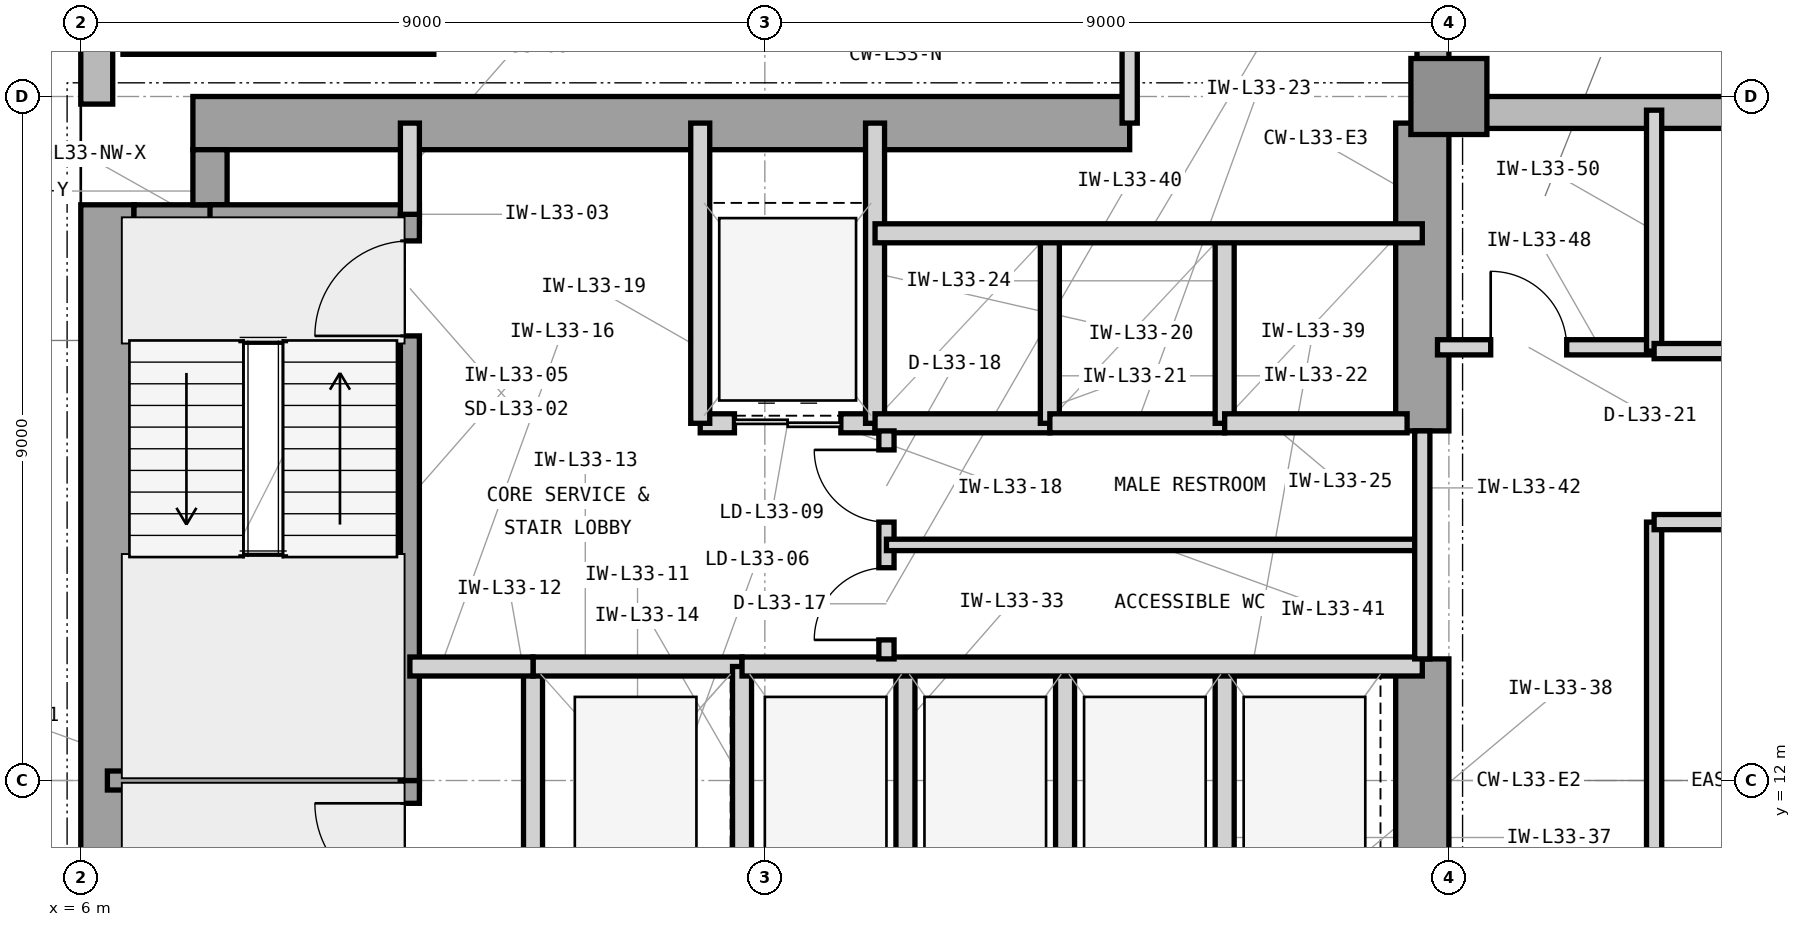
"""IFC4 building model, lengths in metres.
Left out: names, types, materials, properties, quantities, classifications, styles, units other than length and angle.
Written with IfcOpenShell. Run it as: python <this file> out.ifc"""

import sys

from ifc_helpers import new_model, si_unit, direction, frame, frame_2d, origin, origin_2d, place, context, subcontext, project, spatial, rectangle, extrude, element, fill, save


model = new_model("IFC4")
c1 = context("Model", 3, precision=1e-05, world=origin(), true_north=direction((0.0, 1.0)))
c2 = subcontext(c1, "Body", "Model", "MODEL_VIEW")
j1 = project(units=[si_unit("LENGTHUNIT", "METRE"), si_unit("PLANEANGLEUNIT", "RADIAN")], contexts=[c1])
p1 = place(None, origin())
s1 = spatial("IfcSite", under=j1, at=p1, CompositionType="ELEMENT")
p2 = place(p1, origin())
s2 = spatial("IfcBuilding", under=s1, at=p2, CompositionType="ELEMENT")
p3 = place(p2, frame((0.0, 0.0, 140.1)))
s3 = spatial("IfcBuildingStorey", under=s2, at=p3, CompositionType="ELEMENT", Elevation=140.1)
p4 = place(p3, frame((6.35, 4.425, 0.0), z_axis=(0.0, 0.0, 1.0), x_axis=(0.0, 1.0, 0.0)))
e1 = element("IfcWall", 1, at=p4, inside=s3, PredefinedType="SHEAR", context=c2, shape_type="SweptSolid", body=[
    extrude(rectangle(XDim=15.15, YDim=0.7, at=frame_2d((7.575, 0.0))), origin(), (0.0, 0.0, 1.0), 3.9),
])
p5 = place(p3, frame((7.475, 20.65, 0.0), z_axis=(0.0, 0.0, 1.0), x_axis=(1.0, 0.0, 0.0)))
e2 = element("IfcWall", 2, at=p5, inside=s3, PredefinedType="SHEAR", context=c2, shape_type="SweptSolid", body=[
    extrude(rectangle(XDim=12.325, YDim=0.7, at=frame_2d((6.163, 0.0))), origin(), (0.0, 0.0, 1.0), 3.9),
])
p6 = place(p3, frame((23.65, 10.4, 0.0), z_axis=(0.0, 0.0, 1.0), x_axis=(0.0, 1.0, 0.0)))
e3 = element("IfcWall", 3, at=p6, inside=s3, PredefinedType="SHEAR", context=c2, shape_type="SweptSolid", body=[
    extrude(rectangle(XDim=3.2, YDim=0.7, at=frame_2d((1.6, 0.0))), origin(), (0.0, 0.0, 1.0), 3.9),
])
p7 = place(p3, frame((23.65, 16.6, 0.0), z_axis=(0.0, 0.0, 1.0), x_axis=(0.0, 1.0, 0.0)))
e4 = element("IfcWall", 4, at=p7, inside=s3, PredefinedType="SHEAR", context=c2, shape_type="SweptSolid", body=[
    extrude(rectangle(XDim=4.05, YDim=0.7, at=frame_2d((2.025, 0.0))), origin(), (0.0, 0.0, 1.0), 3.9),
])
p8 = place(p3, frame((6.7, 19.35, 0.0), z_axis=(0.0, 0.0, 1.0), x_axis=(1.0, 0.0, 0.0)))
e5 = element("IfcWall", 5, at=p8, inside=s3, PredefinedType="SHEAR", context=c2, shape_type="SweptSolid", body=[
    extrude(rectangle(XDim=1.225, YDim=0.45, at=frame_2d((0.613, 0.0))), origin(), (0.0, 0.0, 1.0), 3.9),
])
p9 = place(p3, frame((7.7, 19.575, 0.0), z_axis=(0.0, 0.0, 1.0), x_axis=(0.0, 1.0, 0.0)))
e6 = element("IfcWall", 6, at=p9, inside=s3, PredefinedType="SHEAR", context=c2, shape_type="SweptSolid", body=[
    extrude(rectangle(XDim=0.725, YDim=0.45, at=frame_2d((0.363, 0.0))), origin(), (0.0, 0.0, 1.0), 3.9),
])
p10 = place(p3, frame((24.0, 21.0, 0.0), z_axis=(0.0, 0.0, 1.0), x_axis=(1.0, 0.0, 0.0)))
e7 = element("IfcColumn", 7, at=p10, inside=s3, PredefinedType="COLUMN", context=c2, shape_type="SweptSolid", body=[
    extrude(rectangle(XDim=1.0, YDim=1.0, at=origin_2d()), origin(), (0.0, 0.0, 1.0), 3.9),
])
p11 = place(p3, frame((58.4, 20.79, 0.0), z_axis=(0.0, 0.0, 1.0), x_axis=(-1.0, 0.0, 0.0)))
e8 = element("IfcWall", 8, at=p11, inside=s3, PredefinedType="STANDARD", context=c2, shape_type="SweptSolid", body=[
    extrude(rectangle(XDim=34.4, YDim=0.42, at=frame_2d((17.2, 0.0))), origin(), (0.0, 0.0, 1.0), 3.7),
])
p12 = place(p11, frame((20.864, 0.0, 0.85)))
e9 = element("IfcOpeningElement", 9, at=p12, cuts=e8, PredefinedType="OPENING", context=c2, shape_type="SweptSolid", body=[
    extrude(rectangle(XDim=2.5, YDim=2.25, at=frame_2d((1.25, 1.125))), frame((0.0, 0.22, 0.0), z_axis=(0.0, -1.0, 0.0), x_axis=(1.0, 0.0, 0.0)), (0.0, 0.0, 1.0), 0.44),
])
p13 = place(p11, frame((11.386, 0.0, 0.85)))
e10 = element("IfcOpeningElement", 10, at=p13, cuts=e8, PredefinedType="OPENING", context=c2, shape_type="SweptSolid", body=[
    extrude(rectangle(XDim=2.5, YDim=2.25, at=frame_2d((1.25, 1.125))), frame((0.0, 0.22, 0.0), z_axis=(0.0, -1.0, 0.0), x_axis=(1.0, 0.0, 0.0)), (0.0, 0.0, 1.0), 0.44),
])
p14 = place(p3, frame((23.79, 21.0, 0.0), z_axis=(0.0, 0.0, 1.0), x_axis=(0.0, 1.0, 0.0)))
e11 = element("IfcWall", 11, at=p14, inside=s3, PredefinedType="STANDARD", context=c2, shape_type="SweptSolid", body=[
    extrude(rectangle(XDim=25.4, YDim=0.42, at=frame_2d((12.7, 0.0))), origin(), (0.0, 0.0, 1.0), 3.7),
])
p15 = place(p14, frame((11.45, 0.0, 0.85)))
e12 = element("IfcOpeningElement", 12, at=p15, cuts=e11, PredefinedType="OPENING", context=c2, shape_type="SweptSolid", body=[
    extrude(rectangle(XDim=2.5, YDim=2.25, at=frame_2d((1.25, 1.125))), frame((0.0, 0.22, 0.0), z_axis=(0.0, -1.0, 0.0), x_axis=(1.0, 0.0, 0.0)), (0.0, 0.0, 1.0), 0.44),
])
p16 = place(p3, frame((6.21, 46.4, 0.0), z_axis=(0.0, 0.0, 1.0), x_axis=(0.0, -1.0, 0.0)))
e13 = element("IfcWall", 13, at=p16, inside=s3, PredefinedType="STANDARD", context=c2, shape_type="SweptSolid", body=[
    extrude(rectangle(XDim=25.5, YDim=0.42, at=frame_2d((12.75, 0.0))), origin(), (0.0, 0.0, 1.0), 3.7),
])
p17 = place(p16, frame((11.5, 0.0, 0.85)))
e14 = element("IfcOpeningElement", 14, at=p17, cuts=e13, PredefinedType="OPENING", context=c2, shape_type="SweptSolid", body=[
    extrude(rectangle(XDim=2.5, YDim=2.25, at=frame_2d((1.25, 1.125))), frame((0.0, 0.22, 0.0), z_axis=(0.0, -1.0, 0.0), x_axis=(1.0, 0.0, 0.0)), (0.0, 0.0, 1.0), 0.44),
])
p18 = place(p16, frame((8.236, 0.0, 0.85)))
e15 = element("IfcOpeningElement", 15, at=p18, cuts=e13, PredefinedType="OPENING", context=c2, shape_type="SweptSolid", body=[
    extrude(rectangle(XDim=1.2, YDim=2.25, at=frame_2d((0.6, 1.125))), frame((0.0, 0.22, 0.0), z_axis=(0.0, -1.0, 0.0), x_axis=(1.0, 0.0, 0.0)), (0.0, 0.0, 1.0), 0.44),
])
p19 = place(p3, frame((6.35, 12.0, 0.0), z_axis=(0.0, 0.0, 1.0), x_axis=(1.0, 0.0, 0.0)))
e16 = element("IfcWall", 16, at=p19, inside=s3, PredefinedType="SHEAR", context=c2, shape_type="SweptSolid", body=[
    extrude(rectangle(XDim=4.105, YDim=0.25, at=frame_2d((2.052, 0.0))), origin(), (0.0, 0.0, 1.0), 3.9),
])
p20 = place(p3, frame((7.7, 19.45, 0.0), z_axis=(0.0, 0.0, 1.0), x_axis=(1.0, 0.0, 0.0)))
e17 = element("IfcWall", 17, at=p20, inside=s3, PredefinedType="SHEAR", context=c2, shape_type="SweptSolid", body=[
    extrude(rectangle(XDim=2.755, YDim=0.25, at=frame_2d((1.377, 0.0))), origin(), (0.0, 0.0, 1.0), 3.9),
])
p21 = place(p3, frame((10.33, 4.55, 0.0), z_axis=(0.0, 0.0, 1.0), x_axis=(0.0, 1.0, 0.0)))
e18 = element("IfcWall", 18, at=p21, inside=s3, PredefinedType="SHEAR", context=c2, shape_type="SweptSolid", body=[
    extrude(rectangle(XDim=7.45, YDim=0.25, at=frame_2d((3.725, 0.0))), origin(), (0.0, 0.0, 1.0), 3.9),
])
p22 = place(p21, frame((5.9, 0.0, 0.0)))
e19 = element("IfcOpeningElement", 19, at=p22, cuts=e18, PredefinedType="OPENING", context=c2, shape_type="SweptSolid", body=[
    extrude(rectangle(XDim=1.25, YDim=2.2, at=frame_2d((0.625, 1.1))), frame((0.0, 0.135, 0.0), z_axis=(0.0, -1.0, 0.0), x_axis=(1.0, 0.0, 0.0)), (0.0, 0.0, 1.0), 0.27),
])
p23 = place(p3, frame((10.33, 12.0, 0.0), z_axis=(0.0, 0.0, 1.0), x_axis=(0.0, 1.0, 0.0)))
e20 = element("IfcWall", 20, at=p23, inside=s3, PredefinedType="SHEAR", context=c2, shape_type="SweptSolid", body=[
    extrude(rectangle(XDim=7.45, YDim=0.25, at=frame_2d((3.725, 0.0))), origin(), (0.0, 0.0, 1.0), 3.9),
])
p24 = place(p23, frame((5.85, 0.0, 0.0)))
e21 = element("IfcOpeningElement", 21, at=p24, cuts=e20, PredefinedType="OPENING", context=c2, shape_type="SweptSolid", body=[
    extrude(rectangle(XDim=1.25, YDim=2.2, at=frame_2d((0.625, 1.1))), frame((0.0, 0.135, 0.0), z_axis=(0.0, -1.0, 0.0), x_axis=(1.0, 0.0, 0.0)), (0.0, 0.0, 1.0), 0.27),
])
p25 = place(p3, frame((10.33, 19.45, 0.0), z_axis=(0.0, 0.0, 1.0), x_axis=(0.0, 1.0, 0.0)))
e22 = element("IfcWall", 22, at=p25, inside=s3, PredefinedType="PARTITIONING", context=c2, shape_type="SweptSolid", body=[
    extrude(rectangle(XDim=1.2, YDim=0.25, at=frame_2d((0.6, 0.0))), origin(), (0.0, 0.0, 1.0), 2.994),
])
p26 = place(p3, frame((11.95, 10.5, 0.0), z_axis=(0.0, 0.0, 1.0), x_axis=(0.0, 1.0, 0.0)))
e23 = element("IfcWall", 23, at=p26, inside=s3, PredefinedType="PARTITIONING", context=c2, shape_type="SweptSolid", body=[
    extrude(rectangle(XDim=3.0, YDim=0.25, at=frame_2d((1.5, 0.0))), origin(), (0.0, 0.0, 1.0), 3.69),
])
p27 = place(p3, frame((11.95, 13.5, 0.0), z_axis=(0.0, 0.0, 1.0), x_axis=(1.0, 0.0, 0.0)))
e24 = element("IfcWall", 24, at=p27, inside=s3, PredefinedType="PARTITIONING", context=c2, shape_type="SweptSolid", body=[
    extrude(rectangle(XDim=2.75, YDim=0.25, at=frame_2d((1.375, 0.0))), origin(), (0.0, 0.0, 1.0), 3.233),
])
p28 = place(p3, frame((14.7, 10.5, 0.0), z_axis=(0.0, 0.0, 1.0), x_axis=(0.0, 1.0, 0.0)))
e25 = element("IfcWall", 25, at=p28, inside=s3, PredefinedType="PARTITIONING", context=c2, shape_type="SweptSolid", body=[
    extrude(rectangle(XDim=3.0, YDim=0.25, at=frame_2d((1.5, 0.0))), origin(), (0.0, 0.0, 1.0), 3.69),
])
p29 = place(p3, frame((10.33, 13.5, 0.0), z_axis=(0.0, 0.0, 1.0), x_axis=(1.0, 0.0, 0.0)))
e26 = element("IfcWall", 26, at=p29, inside=s3, PredefinedType="PARTITIONING", context=c2, shape_type="SweptSolid", body=[
    extrude(rectangle(XDim=1.62, YDim=0.25, at=frame_2d((0.81, 0.0))), origin(), (0.0, 0.0, 1.0), 3.233),
])
p30 = place(p3, frame((14.15, 16.7, 0.0), z_axis=(0.0, 0.0, 1.0), x_axis=(1.0, 0.0, 0.0)))
e27 = element("IfcWall", 27, at=p30, inside=s3, PredefinedType="PARTITIONING", context=c2, shape_type="SweptSolid", body=[
    extrude(rectangle(XDim=2.3, YDim=0.25, at=frame_2d((1.15, 0.0))), origin(), (0.0, 0.0, 1.0), 3.233),
])
p31 = place(p30, frame((0.45, 0.0, 0.0)))
e28 = element("IfcOpeningElement", 28, at=p31, cuts=e27, PredefinedType="OPENING", context=c2, shape_type="SweptSolid", body=[
    extrude(rectangle(XDim=1.4, YDim=2.35, at=frame_2d((0.7, 1.175))), frame((0.0, 0.135, 0.0), z_axis=(0.0, -1.0, 0.0), x_axis=(1.0, 0.0, 0.0)), (0.0, 0.0, 1.0), 0.27),
])
for number, where, z_axis, x_axis in (
    (29, (14.15, 16.7, 0.0), (0.0, 0.0, 1.0), (0.0, 1.0, 0.0)),
    (30, (16.45, 16.7, 0.0), (0.0, 0.0, 1.0), (0.0, 1.0, 0.0)),
):
    element("IfcWall", number, at=place(p3, frame(where, z_axis=z_axis, x_axis=x_axis)), inside=s3, PredefinedType="PARTITIONING", context=c2, shape_type="SweptSolid", body=[
        extrude(rectangle(XDim=3.95, YDim=0.25, at=frame_2d((1.975, 0.0))), origin(), (0.0, 0.0, 1.0), 3.69),
    ])
p32 = place(p3, frame((16.45, 16.7, 0.0), z_axis=(0.0, 0.0, 1.0), x_axis=(1.0, 0.0, 0.0)))
e31 = element("IfcWall", 31, at=p32, inside=s3, PredefinedType="PARTITIONING", context=c2, shape_type="SweptSolid", body=[
    extrude(rectangle(XDim=2.3, YDim=0.25, at=frame_2d((1.15, 0.0))), origin(), (0.0, 0.0, 1.0), 3.233),
])
p33 = place(p3, frame((18.75, 16.7, 0.0), z_axis=(0.0, 0.0, 1.0), x_axis=(0.0, 1.0, 0.0)))
e32 = element("IfcWall", 32, at=p33, inside=s3, PredefinedType="PARTITIONING", context=c2, shape_type="SweptSolid", body=[
    extrude(rectangle(XDim=2.5, YDim=0.25, at=frame_2d((1.25, 0.0))), origin(), (0.0, 0.0, 1.0), 3.69),
])
p34 = place(p3, frame((18.75, 16.7, 0.0), z_axis=(0.0, 0.0, 1.0), x_axis=(1.0, 0.0, 0.0)))
e33 = element("IfcWall", 33, at=p34, inside=s3, PredefinedType="PARTITIONING", context=c2, shape_type="SweptSolid", body=[
    extrude(rectangle(XDim=2.3, YDim=0.25, at=frame_2d((1.15, 0.0))), origin(), (0.0, 0.0, 1.0), 3.233),
])
p35 = place(p3, frame((21.05, 16.7, 0.0), z_axis=(0.0, 0.0, 1.0), x_axis=(0.0, 1.0, 0.0)))
e34 = element("IfcWall", 34, at=p35, inside=s3, PredefinedType="PARTITIONING", context=c2, shape_type="SweptSolid", body=[
    extrude(rectangle(XDim=2.5, YDim=0.25, at=frame_2d((1.25, 0.0))), origin(), (0.0, 0.0, 1.0), 3.69),
])
p36 = place(p3, frame((21.05, 16.7, 0.0), z_axis=(0.0, 0.0, 1.0), x_axis=(1.0, 0.0, 0.0)))
e35 = element("IfcWall", 35, at=p36, inside=s3, PredefinedType="PARTITIONING", context=c2, shape_type="SweptSolid", body=[
    extrude(rectangle(XDim=2.4, YDim=0.25, at=frame_2d((1.2, 0.0))), origin(), (0.0, 0.0, 1.0), 3.233),
])
p37 = place(p3, frame((16.45, 19.2, 0.0), z_axis=(0.0, 0.0, 1.0), x_axis=(1.0, 0.0, 0.0)))
e36 = element("IfcWall", 36, at=p37, inside=s3, PredefinedType="PARTITIONING", context=c2, shape_type="SweptSolid", body=[
    extrude(rectangle(XDim=7.2, YDim=0.25, at=frame_2d((3.6, 0.0))), origin(), (0.0, 0.0, 1.0), 3.69),
])
for number, where, z_axis, x_axis in (
    (37, (16.85, 10.5, 0.0), (0.0, 0.0, 1.0), (0.0, 1.0, 0.0)),
    (38, (18.95, 10.5, 0.0), (0.0, 0.0, 1.0), (0.0, 1.0, 0.0)),
    (39, (21.05, 10.5, 0.0), (0.0, 0.0, 1.0), (0.0, 1.0, 0.0)),
):
    element("IfcWall", number, at=place(p3, frame(where, z_axis=z_axis, x_axis=x_axis)), inside=s3, PredefinedType="PARTITIONING", context=c2, shape_type="SweptSolid", body=[
        extrude(rectangle(XDim=3.0, YDim=0.25, at=frame_2d((1.5, 0.0))), origin(), (0.0, 0.0, 1.0), 3.69),
    ])
p38 = place(p3, frame((14.7, 13.5, 0.0), z_axis=(0.0, 0.0, 1.0), x_axis=(1.0, 0.0, 0.0)))
e40 = element("IfcWall", 40, at=p38, inside=s3, PredefinedType="PARTITIONING", context=c2, shape_type="SweptSolid", body=[
    extrude(rectangle(XDim=8.95, YDim=0.25, at=frame_2d((4.475, 0.0))), origin(), (0.0, 0.0, 1.0), 3.233),
])
p39 = place(p3, frame((16.6, 13.6, 0.0), z_axis=(0.0, 0.0, 1.0), x_axis=(0.0, 1.0, 0.0)))
e41 = element("IfcWall", 41, at=p39, inside=s3, PredefinedType="PARTITIONING", context=c2, shape_type="SweptSolid", body=[
    extrude(rectangle(XDim=3.0, YDim=0.2, at=frame_2d((1.5, 0.0))), origin(), (0.0, 0.0, 1.0), 3.69),
])
p40 = place(p39, frame((0.25, 0.0, 0.0)))
e42 = element("IfcOpeningElement", 42, at=p40, cuts=e41, PredefinedType="OPENING", context=c2, shape_type="SweptSolid", body=[
    extrude(rectangle(XDim=0.95, YDim=2.1, at=frame_2d((0.475, 1.05))), frame((0.0, 0.11, 0.0), z_axis=(0.0, -1.0, 0.0), x_axis=(1.0, 0.0, 0.0)), (0.0, 0.0, 1.0), 0.22),
])
p41 = place(p39, frame((1.8, 0.0, 0.0)))
e43 = element("IfcOpeningElement", 43, at=p41, cuts=e41, PredefinedType="OPENING", context=c2, shape_type="SweptSolid", body=[
    extrude(rectangle(XDim=0.95, YDim=2.1, at=frame_2d((0.475, 1.05))), frame((0.0, 0.11, 0.0), z_axis=(0.0, -1.0, 0.0), x_axis=(1.0, 0.0, 0.0)), (0.0, 0.0, 1.0), 0.22),
])
p42 = place(p3, frame((16.6, 15.1, 0.0), z_axis=(0.0, 0.0, 1.0), x_axis=(1.0, 0.0, 0.0)))
e44 = element("IfcWall", 44, at=p42, inside=s3, PredefinedType="PARTITIONING", context=c2, shape_type="SweptSolid", body=[
    extrude(rectangle(XDim=7.05, YDim=0.15, at=frame_2d((3.525, 0.0))), origin(), (0.0, 0.0, 1.0), 3.69),
])
p43 = place(p3, frame((23.65, 13.6, 0.0), z_axis=(0.0, 0.0, 1.0), x_axis=(0.0, 1.0, 0.0)))
e45 = element("IfcWall", 45, at=p43, inside=s3, PredefinedType="PARTITIONING", context=c2, shape_type="SweptSolid", body=[
    extrude(rectangle(XDim=3.0, YDim=0.2, at=frame_2d((1.5, 0.0))), origin(), (0.0, 0.0, 1.0), 3.69),
])
p44 = place(p3, frame((6.555, 21.68, 0.0), z_axis=(0.0, 0.0, 1.0), x_axis=(1.0, 0.0, 0.0)))
e46 = element("IfcWall", 46, at=p44, inside=s3, PredefinedType="SHEAR", context=c2, shape_type="SweptSolid", body=[
    extrude(rectangle(XDim=4.09, YDim=0.25, at=frame_2d((2.045, 0.0))), origin(), (0.0, 0.0, 1.0), 3.9),
])
p45 = place(p3, frame((23.85, 17.7, 0.0), z_axis=(0.0, 0.0, 1.0), x_axis=(1.0, 0.0, 0.0)))
e47 = element("IfcWall", 47, at=p45, inside=s3, PredefinedType="PARTITIONING", context=c2, shape_type="SweptSolid", body=[
    extrude(rectangle(XDim=2.85, YDim=0.2, at=frame_2d((1.425, 0.0))), origin(), (0.0, 0.0, 1.0), 3.69),
])
p46 = place(p45, frame((0.7, 0.0, 0.0)))
e48 = element("IfcOpeningElement", 48, at=p46, cuts=e47, PredefinedType="OPENING", context=c2, shape_type="SweptSolid", body=[
    extrude(rectangle(XDim=1.0, YDim=2.15, at=frame_2d((0.5, 1.075))), frame((0.0, 0.11, 0.0), z_axis=(0.0, -1.0, 0.0), x_axis=(1.0, 0.0, 0.0)), (0.0, 0.0, 1.0), 0.22),
])
p47 = place(p3, frame((26.7, 3.18, 0.0), z_axis=(0.0, 0.0, 1.0), x_axis=(0.0, 1.0, 0.0)))
e49 = element("IfcWall", 49, at=p47, inside=s3, PredefinedType="PARTITIONING", context=c2, shape_type="SweptSolid", body=[
    extrude(rectangle(XDim=12.22, YDim=0.2, at=frame_2d((6.11, 0.0))), origin(), (0.0, 0.0, 1.0), 3.69),
])
p48 = place(p3, frame((26.7, 17.65, 0.0), z_axis=(0.0, 0.0, 1.0), x_axis=(0.0, 1.0, 0.0)))
e50 = element("IfcWall", 50, at=p48, inside=s3, PredefinedType="PARTITIONING", context=c2, shape_type="SweptSolid", body=[
    extrude(rectangle(XDim=3.17, YDim=0.2, at=frame_2d((1.585, 0.0))), origin(), (0.0, 0.0, 1.0), 3.69),
])
p49 = place(p3, frame((26.7, 15.4, 0.0), z_axis=(0.0, 0.0, 1.0), x_axis=(1.0, 0.0, 0.0)))
e51 = element("IfcWall", 51, at=p49, inside=s3, PredefinedType="PARTITIONING", context=c2, shape_type="SweptSolid", body=[
    extrude(rectangle(XDim=7.0, YDim=0.2, at=frame_2d((3.5, 0.0))), origin(), (0.0, 0.0, 1.0), 3.69),
])
p50 = place(p49, frame((2.5, 0.0, 0.0)))
e52 = element("IfcOpeningElement", 52, at=p50, cuts=e51, PredefinedType="OPENING", context=c2, shape_type="SweptSolid", body=[
    extrude(rectangle(XDim=2.0, YDim=2.5, at=frame_2d((1.0, 1.25))), frame((0.0, 0.11, 0.0), z_axis=(0.0, -1.0, 0.0), x_axis=(1.0, 0.0, 0.0)), (0.0, 0.0, 1.0), 0.22),
])
p51 = place(p3, frame((26.7, 17.65, 0.0), z_axis=(0.0, 0.0, 1.0), x_axis=(1.0, 0.0, 0.0)))
e53 = element("IfcWall", 53, at=p51, inside=s3, PredefinedType="PARTITIONING", context=c2, shape_type="SweptSolid", body=[
    extrude(rectangle(XDim=13.5, YDim=0.2, at=frame_2d((6.75, 0.0))), origin(), (0.0, 0.0, 1.0), 3.69),
])
p52 = place(p51, frame((6.0, 0.0, 0.0)))
e54 = element("IfcOpeningElement", 54, at=p52, cuts=e53, PredefinedType="OPENING", context=c2, shape_type="SweptSolid", body=[
    extrude(rectangle(XDim=1.5, YDim=2.3, at=frame_2d((0.75, 1.15))), frame((0.0, 0.11, 0.0), z_axis=(0.0, -1.0, 0.0), x_axis=(1.0, 0.0, 0.0)), (0.0, 0.0, 1.0), 0.22),
])
p53 = place(p3, frame((19.8, 20.65, 0.0), z_axis=(0.0, 0.0, 1.0), x_axis=(0.0, 1.0, 0.0)))
e55 = element("IfcWall", 55, at=p53, inside=s3, PredefinedType="PARTITIONING", context=c2, shape_type="SweptSolid", body=[
    extrude(rectangle(XDim=6.15, YDim=0.2, at=frame_2d((3.075, 0.0))), origin(), (0.0, 0.0, 1.0), 3.69),
])
p54 = place(p22, origin())
e56 = element("IfcDoor", 56, at=p54, inside=s3, OperationType="SINGLE_SWING_RIGHT", PredefinedType="DOOR", context=c2, shape_type="SweptSolid", body=[
    extrude(rectangle(XDim=1.25, YDim=2.2, at=frame_2d((0.625, 1.1))), frame((0.0, 0.025, 0.0), z_axis=(0.0, -1.0, 0.0), x_axis=(1.0, 0.0, 0.0)), (0.0, 0.0, 1.0), 0.05),
])
fill(e19, e56)
p55 = place(p24, origin())
e57 = element("IfcDoor", 57, at=p55, inside=s3, OperationType="SINGLE_SWING_LEFT", PredefinedType="DOOR", context=c2, shape_type="SweptSolid", body=[
    extrude(rectangle(XDim=1.25, YDim=2.2, at=frame_2d((0.625, 1.1))), frame((0.0, 0.025, 0.0), z_axis=(0.0, -1.0, 0.0), x_axis=(1.0, 0.0, 0.0)), (0.0, 0.0, 1.0), 0.05),
])
fill(e21, e57)
p56 = place(p31, origin())
e58 = element("IfcDoor", 58, at=p56, inside=s3, OperationType="DOUBLE_DOOR_SLIDING", PredefinedType="DOOR", context=c2, shape_type="SweptSolid", body=[
    extrude(rectangle(XDim=1.4, YDim=2.35, at=frame_2d((0.7, 1.175))), frame((0.0, 0.025, 0.0), z_axis=(0.0, -1.0, 0.0), x_axis=(1.0, 0.0, 0.0)), (0.0, 0.0, 1.0), 0.05),
])
fill(e28, e58)
p57 = place(p40, origin())
e59 = element("IfcDoor", 59, at=p57, inside=s3, OperationType="SINGLE_SWING_LEFT", PredefinedType="DOOR", context=c2, shape_type="SweptSolid", body=[
    extrude(rectangle(XDim=0.95, YDim=2.1, at=frame_2d((0.475, 1.05))), frame((0.0, 0.025, 0.0), z_axis=(0.0, -1.0, 0.0), x_axis=(1.0, 0.0, 0.0)), (0.0, 0.0, 1.0), 0.05),
])
fill(e42, e59)
p58 = place(p41, origin())
e60 = element("IfcDoor", 60, at=p58, inside=s3, OperationType="SINGLE_SWING_RIGHT", PredefinedType="DOOR", context=c2, shape_type="SweptSolid", body=[
    extrude(rectangle(XDim=0.95, YDim=2.1, at=frame_2d((0.475, 1.05))), frame((0.0, 0.025, 0.0), z_axis=(0.0, -1.0, 0.0), x_axis=(1.0, 0.0, 0.0)), (0.0, 0.0, 1.0), 0.05),
])
fill(e43, e60)
p59 = place(p46, origin())
e61 = element("IfcDoor", 61, at=p59, inside=s3, OperationType="SINGLE_SWING_LEFT", PredefinedType="DOOR", context=c2, shape_type="SweptSolid", body=[
    extrude(rectangle(XDim=1.0, YDim=2.15, at=frame_2d((0.5, 1.075))), frame((0.0, 0.025, 0.0), z_axis=(0.0, -1.0, 0.0), x_axis=(1.0, 0.0, 0.0)), (0.0, 0.0, 1.0), 0.05),
])
fill(e48, e61)
save(model, sys.argv[1])
